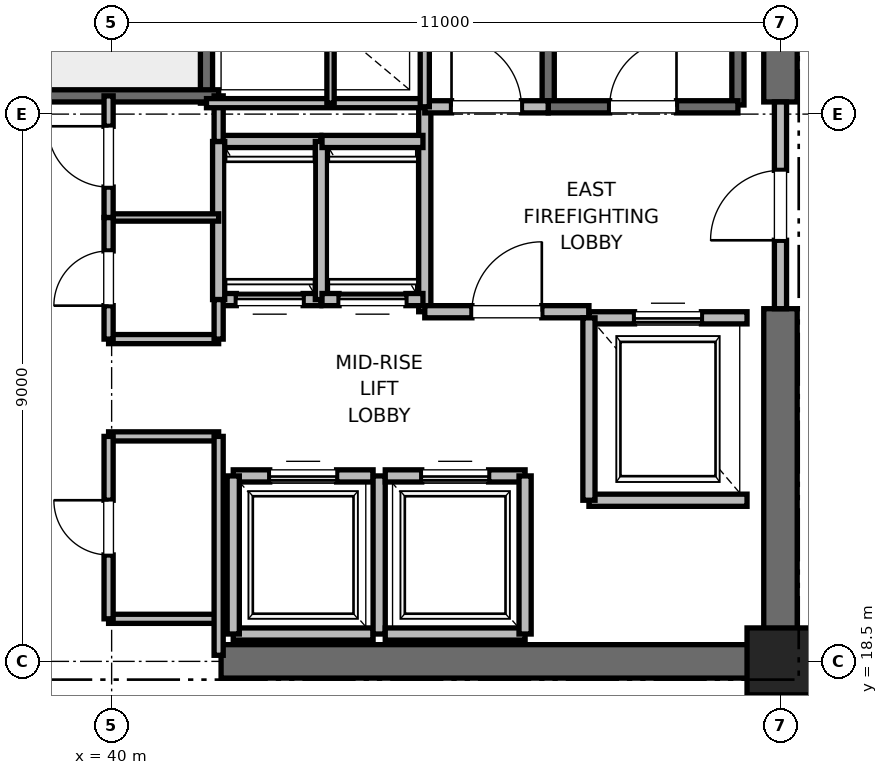
"""IFC4 building model, lengths in metres.
Left out: names, types, materials, properties, quantities, classifications, styles, units other than length and angle.
Written with IfcOpenShell. Run it as: python <this file> out.ifc"""

import sys

from ifc_helpers import new_model, si_unit, direction, frame, frame_2d, origin, origin_2d, place, context, subcontext, project, spatial, rectangle, extrude, element, fill, save


model = new_model("IFC4")
c1 = context("Model", 3, precision=1e-05, world=origin(), true_north=direction((0.0, 1.0)))
c2 = subcontext(c1, "Body", "Model", "MODEL_VIEW")
j1 = project(units=[si_unit("LENGTHUNIT", "METRE"), si_unit("PLANEANGLEUNIT", "RADIAN")], contexts=[c1])
p1 = place(None, origin())
s1 = spatial("IfcSite", under=j1, at=p1, CompositionType="ELEMENT")
p2 = place(p1, origin())
s2 = spatial("IfcBuilding", under=s1, at=p2, CompositionType="ELEMENT")
p3 = place(p2, frame((0.0, 0.0, 172.4)))
s3 = spatial("IfcBuildingStorey", under=s2, at=p3, CompositionType="ELEMENT", Elevation=172.4)
p4 = place(p3, frame((51.0, 18.5, 0.0), z_axis=(0.0, 0.0, 1.0), x_axis=(1.0, 0.0, 0.0)))
e1 = element("IfcColumn", 1, at=p4, inside=s3, PredefinedType="PILASTER", context=c2, shape_type="SweptSolid", body=[
    extrude(rectangle(XDim=1.1, YDim=1.1, at=origin_2d()), origin(), (0.0, 0.0, 1.0), 4.0),
])
p5 = place(p3, frame((41.8, 18.5, 0.0), z_axis=(0.0, 0.0, 1.0), x_axis=(1.0, 0.0, 0.0)))
e2 = element("IfcWall", 2, at=p5, inside=s3, PredefinedType="SHEAR", context=c2, shape_type="SweptSolid", body=[
    extrude(rectangle(XDim=9.2, YDim=0.55, at=frame_2d((4.6, 0.0))), origin(), (0.0, 0.0, 1.0), 3.775),
])
p6 = place(p3, frame((51.0, 18.5, 0.0), z_axis=(0.0, 0.0, 1.0), x_axis=(0.0, 1.0, 0.0)))
e3 = element("IfcWall", 3, at=p6, inside=s3, PredefinedType="SHEAR", context=c2, shape_type="SweptSolid", body=[
    extrude(rectangle(XDim=5.8, YDim=0.55, at=frame_2d((2.9, 0.0))), origin(), (0.0, 0.0, 1.0), 3.775),
])
p7 = place(p3, frame((51.0, 27.7, 0.0), z_axis=(0.0, 0.0, 1.0), x_axis=(0.0, 1.0, 0.0)))
e4 = element("IfcWall", 4, at=p7, inside=s3, PredefinedType="SHEAR", context=c2, shape_type="SweptSolid", body=[
    extrude(rectangle(XDim=8.8, YDim=0.55, at=frame_2d((4.4, 0.0))), origin(), (0.0, 0.0, 1.0), 3.775),
])
p8 = place(p3, frame((50.3, 27.65, 0.0), z_axis=(0.0, 0.0, 1.0), x_axis=(0.0, 1.0, 0.0)))
e5 = element("IfcWall", 5, at=p8, inside=s3, PredefinedType="SOLIDWALL", context=c2, shape_type="SweptSolid", body=[
    extrude(rectangle(XDim=8.15, YDim=0.2, at=frame_2d((4.075, 0.0))), origin(), (0.0, 0.0, 1.0), 3.775),
])
p9 = place(p3, frame((47.18, 27.62, 0.0), z_axis=(0.0, 0.0, 1.0), x_axis=(0.0, 1.0, 0.0)))
e6 = element("IfcWall", 6, at=p9, inside=s3, PredefinedType="SOLIDWALL", context=c2, shape_type="SweptSolid", body=[
    extrude(rectangle(XDim=8.18, YDim=0.2, at=frame_2d((4.09, 0.0))), origin(), (0.0, 0.0, 1.0), 3.775),
])
p10 = place(p3, frame((47.18, 27.62, 0.0), z_axis=(0.0, 0.0, 1.0), x_axis=(1.0, 0.0, 0.0)))
e7 = element("IfcWall", 7, at=p10, inside=s3, PredefinedType="SOLIDWALL", context=c2, shape_type="SweptSolid", body=[
    extrude(rectangle(XDim=3.12, YDim=0.2, at=frame_2d((1.56, 0.0))), origin(), (0.0, 0.0, 1.0), 3.775),
])
p11 = place(p10, frame((1.01, 0.0, 0.0)))
e8 = element("IfcOpeningElement", 8, at=p11, cuts=e7, PredefinedType="OPENING", context=c2, shape_type="SweptSolid", body=[
    extrude(rectangle(XDim=1.1, YDim=2.15, at=frame_2d((0.55, 1.075))), frame((0.0, 0.1, 0.0), z_axis=(0.0, -1.0, 0.0), x_axis=(1.0, 0.0, 0.0)), (0.0, 0.0, 1.0), 0.2),
])
p12 = place(p3, frame((41.56, 27.68, 0.0), z_axis=(0.0, 0.0, 1.0), x_axis=(0.0, 1.0, 0.0)))
e9 = element("IfcWall", 9, at=p12, inside=s3, PredefinedType="SOLIDWALL", context=c2, shape_type="SweptSolid", body=[
    extrude(rectangle(XDim=8.57, YDim=0.2, at=frame_2d((4.285, 0.0))), origin(), (0.0, 0.0, 1.0), 3.775),
])
p13 = place(p3, frame((38.44, 27.8, 0.0), z_axis=(0.0, 0.0, 1.0), x_axis=(1.0, 0.0, 0.0)))
e10 = element("IfcWall", 10, at=p13, inside=s3, PredefinedType="SOLIDWALL", context=c2, shape_type="SweptSolid", body=[
    extrude(rectangle(XDim=3.32, YDim=0.2, at=frame_2d((1.66, 0.0))), origin(), (0.0, 0.0, 1.0), 3.775),
])
p14 = place(p3, frame((45.15, 24.25, 0.0), z_axis=(0.0, 0.0, 1.0), x_axis=(0.0, 1.0, 0.0)))
e11 = element("IfcWall", 11, at=p14, inside=s3, PredefinedType="PARTITIONING", context=c2, shape_type="SweptSolid", body=[
    extrude(rectangle(XDim=3.37, YDim=0.2, at=frame_2d((1.685, 0.0))), origin(), (0.0, 0.0, 1.0), 3.775),
])
p15 = place(p3, frame((45.15, 24.25, 0.0), z_axis=(0.0, 0.0, 1.0), x_axis=(1.0, 0.0, 0.0)))
e12 = element("IfcWall", 12, at=p15, inside=s3, PredefinedType="PARTITIONING", context=c2, shape_type="SweptSolid", body=[
    extrude(rectangle(XDim=2.7, YDim=0.2, at=frame_2d((1.35, 0.0))), origin(), (0.0, 0.0, 1.0), 3.775),
])
p16 = place(p15, frame((0.775, 0.0, 0.0)))
e13 = element("IfcOpeningElement", 13, at=p16, cuts=e12, PredefinedType="OPENING", context=c2, shape_type="SweptSolid", body=[
    extrude(rectangle(XDim=1.15, YDim=2.2, at=frame_2d((0.575, 1.1))), frame((0.0, 0.1, 0.0), z_axis=(0.0, -1.0, 0.0), x_axis=(1.0, 0.0, 0.0)), (0.0, 0.0, 1.0), 0.2),
])
p17 = place(p3, frame((45.15, 27.62, 0.0), z_axis=(0.0, 0.0, 1.0), x_axis=(1.0, 0.0, 0.0)))
e14 = element("IfcWall", 14, at=p17, inside=s3, PredefinedType="PARTITIONING", context=c2, shape_type="SweptSolid", body=[
    extrude(rectangle(XDim=2.03, YDim=0.2, at=frame_2d((1.015, 0.0))), origin(), (0.0, 0.0, 1.0), 3.775),
])
p18 = place(p17, frame((0.44, 0.0, 0.0)))
e15 = element("IfcOpeningElement", 15, at=p18, cuts=e14, PredefinedType="OPENING", context=c2, shape_type="SweptSolid", body=[
    extrude(rectangle(XDim=1.15, YDim=2.2, at=frame_2d((0.575, 1.1))), frame((0.0, 0.1, 0.0), z_axis=(0.0, -1.0, 0.0), x_axis=(1.0, 0.0, 0.0)), (0.0, 0.0, 1.0), 0.2),
])
p19 = place(p3, frame((51.0, 24.3, 0.0), z_axis=(0.0, 0.0, 1.0), x_axis=(0.0, 1.0, 0.0)))
e16 = element("IfcWall", 16, at=p19, inside=s3, PredefinedType="PARTITIONING", context=c2, shape_type="SweptSolid", body=[
    extrude(rectangle(XDim=3.4, YDim=0.2, at=frame_2d((1.7, 0.0))), origin(), (0.0, 0.0, 1.0), 2.755),
])
p20 = place(p19, frame((1.125, 0.0, 0.0)))
e17 = element("IfcOpeningElement", 17, at=p20, cuts=e16, PredefinedType="OPENING", context=c2, shape_type="SweptSolid", body=[
    extrude(rectangle(XDim=1.15, YDim=2.2, at=frame_2d((0.575, 1.1))), frame((0.0, 0.1, 0.0), z_axis=(0.0, -1.0, 0.0), x_axis=(1.0, 0.0, 0.0)), (0.0, 0.0, 1.0), 0.2),
])
p21 = place(p3, frame((47.85, 21.15, 0.0), z_axis=(0.0, 0.0, 1.0), x_axis=(1.0, 0.0, 0.0)))
e18 = element("IfcWall", 18, at=p21, inside=s3, PredefinedType="SOLIDWALL", context=c2, shape_type="SweptSolid", body=[
    extrude(rectangle(XDim=2.6, YDim=0.2, at=frame_2d((1.3, 0.0))), origin(), (0.0, 0.0, 1.0), 3.775),
])
p22 = place(p3, frame((50.45, 24.15, 0.0), z_axis=(0.0, 0.0, 1.0), x_axis=(-1.0, 0.0, 0.0)))
e19 = element("IfcWall", 19, at=p22, inside=s3, PredefinedType="SOLIDWALL", context=c2, shape_type="SweptSolid", body=[
    extrude(rectangle(XDim=2.6, YDim=0.2, at=frame_2d((1.3, 0.0))), origin(), (0.0, 0.0, 1.0), 2.755),
])
p23 = place(p22, frame((0.75, 0.0, 0.0)))
e20 = element("IfcOpeningElement", 20, at=p23, cuts=e19, PredefinedType="OPENING", context=c2, shape_type="SweptSolid", body=[
    extrude(rectangle(XDim=1.1, YDim=2.2, at=frame_2d((0.55, 1.1))), frame((0.0, 0.1, 0.0), z_axis=(0.0, -1.0, 0.0), x_axis=(1.0, 0.0, 0.0)), (0.0, 0.0, 1.0), 0.2),
])
p24 = place(p3, frame((47.85, 24.15, 0.0), z_axis=(0.0, 0.0, 1.0), x_axis=(0.0, -1.0, 0.0)))
e21 = element("IfcWall", 21, at=p24, inside=s3, PredefinedType="SOLIDWALL", context=c2, shape_type="SweptSolid", body=[
    extrude(rectangle(XDim=3.0, YDim=0.2, at=frame_2d((1.5, 0.0))), origin(), (0.0, 0.0, 1.0), 3.775),
])
p25 = place(p3, frame((42.0, 18.95, 0.0), z_axis=(0.0, 0.0, 1.0), x_axis=(1.0, 0.0, 0.0)))
e22 = element("IfcWall", 22, at=p25, inside=s3, PredefinedType="SOLIDWALL", context=c2, shape_type="SweptSolid", body=[
    extrude(rectangle(XDim=2.3, YDim=0.2, at=frame_2d((1.15, 0.0))), origin(), (0.0, 0.0, 1.0), 2.755),
])
p26 = place(p3, frame((44.3, 21.55, 0.0), z_axis=(0.0, 0.0, 1.0), x_axis=(-1.0, 0.0, 0.0)))
e23 = element("IfcWall", 23, at=p26, inside=s3, PredefinedType="SOLIDWALL", context=c2, shape_type="SweptSolid", body=[
    extrude(rectangle(XDim=2.3, YDim=0.2, at=frame_2d((1.15, 0.0))), origin(), (0.0, 0.0, 1.0), 3.775),
])
p27 = place(p26, frame((0.6, 0.0, 0.0)))
e24 = element("IfcOpeningElement", 24, at=p27, cuts=e23, PredefinedType="OPENING", context=c2, shape_type="SweptSolid", body=[
    extrude(rectangle(XDim=1.1, YDim=2.2, at=frame_2d((0.55, 1.1))), frame((0.0, 0.1, 0.0), z_axis=(0.0, -1.0, 0.0), x_axis=(1.0, 0.0, 0.0)), (0.0, 0.0, 1.0), 0.2),
])
p28 = place(p3, frame((42.0, 21.55, 0.0), z_axis=(0.0, 0.0, 1.0), x_axis=(0.0, -1.0, 0.0)))
e25 = element("IfcWall", 25, at=p28, inside=s3, PredefinedType="SOLIDWALL", context=c2, shape_type="SweptSolid", body=[
    extrude(rectangle(XDim=2.6, YDim=0.2, at=frame_2d((1.3, 0.0))), origin(), (0.0, 0.0, 1.0), 2.755),
])
p29 = place(p3, frame((44.4, 18.95, 0.0), z_axis=(0.0, 0.0, 1.0), x_axis=(0.0, 1.0, 0.0)))
e26 = element("IfcWall", 26, at=p29, inside=s3, PredefinedType="SOLIDWALL", context=c2, shape_type="SweptSolid", body=[
    extrude(rectangle(XDim=2.6, YDim=0.2, at=frame_2d((1.3, 0.0))), origin(), (0.0, 0.0, 1.0), 3.775),
])
p30 = place(p3, frame((44.5, 18.95, 0.0), z_axis=(0.0, 0.0, 1.0), x_axis=(1.0, 0.0, 0.0)))
e27 = element("IfcWall", 27, at=p30, inside=s3, PredefinedType="SOLIDWALL", context=c2, shape_type="SweptSolid", body=[
    extrude(rectangle(XDim=2.3, YDim=0.2, at=frame_2d((1.15, 0.0))), origin(), (0.0, 0.0, 1.0), 3.775),
])
p31 = place(p3, frame((46.8, 21.55, 0.0), z_axis=(0.0, 0.0, 1.0), x_axis=(-1.0, 0.0, 0.0)))
e28 = element("IfcWall", 28, at=p31, inside=s3, PredefinedType="SOLIDWALL", context=c2, shape_type="SweptSolid", body=[
    extrude(rectangle(XDim=2.3, YDim=0.2, at=frame_2d((1.15, 0.0))), origin(), (0.0, 0.0, 1.0), 3.775),
])
p32 = place(p31, frame((0.6, 0.0, 0.0)))
e29 = element("IfcOpeningElement", 29, at=p32, cuts=e28, PredefinedType="OPENING", context=c2, shape_type="SweptSolid", body=[
    extrude(rectangle(XDim=1.1, YDim=2.2, at=frame_2d((0.55, 1.1))), frame((0.0, 0.1, 0.0), z_axis=(0.0, -1.0, 0.0), x_axis=(1.0, 0.0, 0.0)), (0.0, 0.0, 1.0), 0.2),
])
p33 = place(p3, frame((46.8, 18.95, 0.0), z_axis=(0.0, 0.0, 1.0), x_axis=(0.0, 1.0, 0.0)))
e30 = element("IfcWall", 30, at=p33, inside=s3, PredefinedType="SOLIDWALL", context=c2, shape_type="SweptSolid", body=[
    extrude(rectangle(XDim=2.6, YDim=0.2, at=frame_2d((1.3, 0.0))), origin(), (0.0, 0.0, 1.0), 3.775),
])
p34 = place(p3, frame((41.76, 24.45, 0.0), z_axis=(0.0, 0.0, 1.0), x_axis=(1.0, 0.0, 0.0)))
e31 = element("IfcWall", 31, at=p34, inside=s3, PredefinedType="SOLIDWALL", context=c2, shape_type="SweptSolid", body=[
    extrude(rectangle(XDim=1.68, YDim=0.2, at=frame_2d((0.84, 0.0))), origin(), (0.0, 0.0, 1.0), 3.775),
])
p35 = place(p34, frame((0.29, 0.0, 0.0)))
e32 = element("IfcOpeningElement", 32, at=p35, cuts=e31, PredefinedType="OPENING", context=c2, shape_type="SweptSolid", body=[
    extrude(rectangle(XDim=1.1, YDim=2.2, at=frame_2d((0.55, 1.1))), frame((0.0, 0.1, 0.0), z_axis=(0.0, -1.0, 0.0), x_axis=(1.0, 0.0, 0.0)), (0.0, 0.0, 1.0), 0.2),
])
p36 = place(p3, frame((43.44, 27.05, 0.0), z_axis=(0.0, 0.0, 1.0), x_axis=(-1.0, 0.0, 0.0)))
e33 = element("IfcWall", 33, at=p36, inside=s3, PredefinedType="SOLIDWALL", context=c2, shape_type="SweptSolid", body=[
    extrude(rectangle(XDim=1.68, YDim=0.2, at=frame_2d((0.84, 0.0))), origin(), (0.0, 0.0, 1.0), 3.775),
])
for number, where, z_axis, x_axis in (
    (34, (41.76, 27.05, 0.0), (0.0, 0.0, 1.0), (0.0, -1.0, 0.0)),
    (35, (43.45, 24.45, 0.0), (0.0, 0.0, 1.0), (0.0, 1.0, 0.0)),
):
    element("IfcWall", number, at=place(p3, frame(where, z_axis=z_axis, x_axis=x_axis)), inside=s3, PredefinedType="SOLIDWALL", context=c2, shape_type="SweptSolid", body=[
        extrude(rectangle(XDim=2.6, YDim=0.2, at=frame_2d((1.3, 0.0))), origin(), (0.0, 0.0, 1.0), 3.775),
    ])
p37 = place(p3, frame((43.46, 24.45, 0.0), z_axis=(0.0, 0.0, 1.0), x_axis=(1.0, 0.0, 0.0)))
e36 = element("IfcWall", 36, at=p37, inside=s3, PredefinedType="SOLIDWALL", context=c2, shape_type="SweptSolid", body=[
    extrude(rectangle(XDim=1.66, YDim=0.2, at=frame_2d((0.83, 0.0))), origin(), (0.0, 0.0, 1.0), 3.775),
])
p38 = place(p37, frame((0.28, 0.0, 0.0)))
e37 = element("IfcOpeningElement", 37, at=p38, cuts=e36, PredefinedType="OPENING", context=c2, shape_type="SweptSolid", body=[
    extrude(rectangle(XDim=1.1, YDim=2.2, at=frame_2d((0.55, 1.1))), frame((0.0, 0.1, 0.0), z_axis=(0.0, -1.0, 0.0), x_axis=(1.0, 0.0, 0.0)), (0.0, 0.0, 1.0), 0.2),
])
p39 = place(p3, frame((45.12, 27.05, 0.0), z_axis=(0.0, 0.0, 1.0), x_axis=(-1.0, 0.0, 0.0)))
e38 = element("IfcWall", 38, at=p39, inside=s3, PredefinedType="SOLIDWALL", context=c2, shape_type="SweptSolid", body=[
    extrude(rectangle(XDim=1.66, YDim=0.2, at=frame_2d((0.83, 0.0))), origin(), (0.0, 0.0, 1.0), 3.775),
])
for number, where, z_axis, x_axis in (
    (39, (39.95, 19.2, 0.0), (0.0, 0.0, 1.0), (1.0, 0.0, 0.0)),
    (40, (39.95, 22.2, 0.0), (0.0, 0.0, 1.0), (1.0, 0.0, 0.0)),
    (41, (39.95, 23.8, 0.0), (0.0, 0.0, 1.0), (1.0, 0.0, 0.0)),
):
    element("IfcWall", number, at=place(p3, frame(where, z_axis=z_axis, x_axis=x_axis)), inside=s3, PredefinedType="PARTITIONING", context=c2, shape_type="SweptSolid", body=[
        extrude(rectangle(XDim=1.81, YDim=0.15, at=frame_2d((0.905, 0.0))), origin(), (0.0, 0.0, 1.0), 2.85),
    ])
p40 = place(p3, frame((39.95, 25.8, 0.0), z_axis=(0.0, 0.0, 1.0), x_axis=(1.0, 0.0, 0.0)))
e42 = element("IfcWall", 42, at=p40, inside=s3, PredefinedType="PARTITIONING", context=c2, shape_type="SweptSolid", body=[
    extrude(rectangle(XDim=1.81, YDim=0.12, at=frame_2d((0.905, 0.0))), origin(), (0.0, 0.0, 1.0), 2.85),
])
p41 = place(p3, frame((41.76, 18.6, 0.0), z_axis=(0.0, 0.0, 1.0), x_axis=(0.0, 1.0, 0.0)))
e43 = element("IfcWall", 43, at=p41, inside=s3, PredefinedType="PARTITIONING", context=c2, shape_type="SweptSolid", body=[
    extrude(rectangle(XDim=3.6, YDim=0.15, at=frame_2d((1.8, 0.0))), origin(), (0.0, 0.0, 1.0), 2.755),
])
p42 = place(p3, frame((41.76, 23.8, 0.0), z_axis=(0.0, 0.0, 1.0), x_axis=(0.0, 1.0, 0.0)))
e44 = element("IfcWall", 44, at=p42, inside=s3, PredefinedType="PARTITIONING", context=c2, shape_type="SweptSolid", body=[
    extrude(rectangle(XDim=0.65, YDim=0.15, at=frame_2d((0.325, 0.0))), origin(), (0.0, 0.0, 1.0), 2.85),
])
p43 = place(p3, frame((41.76, 27.05, 0.0), z_axis=(0.0, 0.0, 1.0), x_axis=(0.0, 1.0, 0.0)))
e45 = element("IfcWall", 45, at=p43, inside=s3, PredefinedType="PARTITIONING", context=c2, shape_type="SweptSolid", body=[
    extrude(rectangle(XDim=0.75, YDim=0.15, at=frame_2d((0.375, 0.0))), origin(), (0.0, 0.0, 1.0), 2.85),
])
p44 = place(p3, frame((39.95, 19.2, 0.0), z_axis=(0.0, 0.0, 1.0), x_axis=(0.0, 1.0, 0.0)))
e46 = element("IfcWall", 46, at=p44, inside=s3, PredefinedType="PARTITIONING", context=c2, shape_type="SweptSolid", body=[
    extrude(rectangle(XDim=3.0, YDim=0.15, at=frame_2d((1.5, 0.0))), origin(), (0.0, 0.0, 1.0), 2.85),
])
p45 = place(p44, frame((1.05, 0.0, 0.0)))
e47 = element("IfcOpeningElement", 47, at=p45, cuts=e46, PredefinedType="OPENING", context=c2, shape_type="SweptSolid", body=[
    extrude(rectangle(XDim=0.9, YDim=2.1, at=frame_2d((0.45, 1.05))), frame((0.0, 0.075, 0.0), z_axis=(0.0, -1.0, 0.0), x_axis=(1.0, 0.0, 0.0)), (0.0, 0.0, 1.0), 0.15),
])
p46 = place(p3, frame((39.95, 23.8, 0.0), z_axis=(0.0, 0.0, 1.0), x_axis=(0.0, 1.0, 0.0)))
e48 = element("IfcWall", 48, at=p46, inside=s3, PredefinedType="PARTITIONING", context=c2, shape_type="SweptSolid", body=[
    extrude(rectangle(XDim=2.0, YDim=0.15, at=frame_2d((1.0, 0.0))), origin(), (0.0, 0.0, 1.0), 2.85),
])
p47 = place(p46, frame((0.55, 0.0, 0.0)))
e49 = element("IfcOpeningElement", 49, at=p47, cuts=e48, PredefinedType="OPENING", context=c2, shape_type="SweptSolid", body=[
    extrude(rectangle(XDim=0.9, YDim=2.1, at=frame_2d((0.45, 1.05))), frame((0.0, 0.075, 0.0), z_axis=(0.0, -1.0, 0.0), x_axis=(1.0, 0.0, 0.0)), (0.0, 0.0, 1.0), 0.15),
])
p48 = place(p3, frame((39.95, 25.8, 0.0), z_axis=(0.0, 0.0, 1.0), x_axis=(0.0, 1.0, 0.0)))
e50 = element("IfcWall", 50, at=p48, inside=s3, PredefinedType="PARTITIONING", context=c2, shape_type="SweptSolid", body=[
    extrude(rectangle(XDim=2.0, YDim=0.15, at=frame_2d((1.0, 0.0))), origin(), (0.0, 0.0, 1.0), 2.85),
])
p49 = place(p48, frame((0.5, 0.0, 0.0)))
e51 = element("IfcOpeningElement", 51, at=p49, cuts=e50, PredefinedType="OPENING", context=c2, shape_type="SweptSolid", body=[
    extrude(rectangle(XDim=1.0, YDim=2.15, at=frame_2d((0.5, 1.075))), frame((0.0, 0.075, 0.0), z_axis=(0.0, -1.0, 0.0), x_axis=(1.0, 0.0, 0.0)), (0.0, 0.0, 1.0), 0.15),
])
p50 = place(p3, frame((41.56, 27.68, 0.0), z_axis=(0.0, 0.0, 1.0), x_axis=(1.0, 0.0, 0.0)))
e52 = element("IfcWall", 52, at=p50, inside=s3, PredefinedType="PARTITIONING", context=c2, shape_type="SweptSolid", body=[
    extrude(rectangle(XDim=3.59, YDim=0.15, at=frame_2d((1.795, 0.0))), origin(), (0.0, 0.0, 1.0), 2.85),
])
p51 = place(p3, frame((45.15, 27.62, 0.0), z_axis=(0.0, 0.0, 1.0), x_axis=(0.0, 1.0, 0.0)))
e53 = element("IfcWall", 53, at=p51, inside=s3, PredefinedType="PARTITIONING", context=c2, shape_type="SweptSolid", body=[
    extrude(rectangle(XDim=3.1, YDim=0.15, at=frame_2d((1.55, 0.0))), origin(), (0.0, 0.0, 1.0), 2.85),
])
p52 = place(p3, frame((43.6, 27.68, 0.0), z_axis=(0.0, 0.0, 1.0), x_axis=(0.0, 1.0, 0.0)))
e54 = element("IfcWall", 54, at=p52, inside=s3, PredefinedType="PARTITIONING", context=c2, shape_type="SweptSolid", body=[
    extrude(rectangle(XDim=3.04, YDim=0.12, at=frame_2d((1.52, 0.0))), origin(), (0.0, 0.0, 1.0), 2.85),
])
p53 = place(p11, origin())
e55 = element("IfcDoor", 55, at=p53, inside=s3, OperationType="SINGLE_SWING_RIGHT", PredefinedType="DOOR", context=c2, shape_type="SweptSolid", body=[
    extrude(rectangle(XDim=1.1, YDim=2.15, at=frame_2d((0.55, 1.075))), frame((0.0, 0.025, 0.0), z_axis=(0.0, -1.0, 0.0), x_axis=(1.0, 0.0, 0.0)), (0.0, 0.0, 1.0), 0.05),
])
fill(e8, e55)
p54 = place(p16, origin())
e56 = element("IfcDoor", 56, at=p54, inside=s3, OperationType="SINGLE_SWING_RIGHT", PredefinedType="DOOR", context=c2, shape_type="SweptSolid", body=[
    extrude(rectangle(XDim=1.15, YDim=2.2, at=frame_2d((0.575, 1.1))), frame((0.0, 0.025, 0.0), z_axis=(0.0, -1.0, 0.0), x_axis=(1.0, 0.0, 0.0)), (0.0, 0.0, 1.0), 0.05),
])
fill(e13, e56)
p55 = place(p18, origin())
e57 = element("IfcDoor", 57, at=p55, inside=s3, OperationType="SINGLE_SWING_LEFT", PredefinedType="DOOR", context=c2, shape_type="SweptSolid", body=[
    extrude(rectangle(XDim=1.15, YDim=2.2, at=frame_2d((0.575, 1.1))), frame((0.0, 0.025, 0.0), z_axis=(0.0, -1.0, 0.0), x_axis=(1.0, 0.0, 0.0)), (0.0, 0.0, 1.0), 0.05),
])
fill(e15, e57)
p56 = place(p20, origin())
e58 = element("IfcDoor", 58, at=p56, inside=s3, OperationType="SINGLE_SWING_LEFT", PredefinedType="DOOR", context=c2, shape_type="SweptSolid", body=[
    extrude(rectangle(XDim=1.15, YDim=2.2, at=frame_2d((0.575, 1.1))), frame((0.0, 0.025, 0.0), z_axis=(0.0, -1.0, 0.0), x_axis=(1.0, 0.0, 0.0)), (0.0, 0.0, 1.0), 0.05),
])
fill(e17, e58)
p57 = place(p23, origin())
e59 = element("IfcDoor", 59, at=p57, inside=s3, OperationType="SLIDING_TO_RIGHT", PredefinedType="DOOR", context=c2, shape_type="SweptSolid", body=[
    extrude(rectangle(XDim=1.1, YDim=2.2, at=frame_2d((0.55, 1.1))), frame((0.0, 0.025, 0.0), z_axis=(0.0, -1.0, 0.0), x_axis=(1.0, 0.0, 0.0)), (0.0, 0.0, 1.0), 0.05),
])
fill(e20, e59)
p58 = place(p27, origin())
e60 = element("IfcDoor", 60, at=p58, inside=s3, OperationType="SLIDING_TO_RIGHT", PredefinedType="DOOR", context=c2, shape_type="SweptSolid", body=[
    extrude(rectangle(XDim=1.1, YDim=2.2, at=frame_2d((0.55, 1.1))), frame((0.0, 0.025, 0.0), z_axis=(0.0, -1.0, 0.0), x_axis=(1.0, 0.0, 0.0)), (0.0, 0.0, 1.0), 0.05),
])
fill(e24, e60)
p59 = place(p32, origin())
e61 = element("IfcDoor", 61, at=p59, inside=s3, OperationType="SLIDING_TO_RIGHT", PredefinedType="DOOR", context=c2, shape_type="SweptSolid", body=[
    extrude(rectangle(XDim=1.1, YDim=2.2, at=frame_2d((0.55, 1.1))), frame((0.0, 0.025, 0.0), z_axis=(0.0, -1.0, 0.0), x_axis=(1.0, 0.0, 0.0)), (0.0, 0.0, 1.0), 0.05),
])
fill(e29, e61)
p60 = place(p35, origin())
e62 = element("IfcDoor", 62, at=p60, inside=s3, OperationType="SLIDING_TO_RIGHT", PredefinedType="DOOR", context=c2, shape_type="SweptSolid", body=[
    extrude(rectangle(XDim=1.1, YDim=2.2, at=frame_2d((0.55, 1.1))), frame((0.0, 0.025, 0.0), z_axis=(0.0, -1.0, 0.0), x_axis=(1.0, 0.0, 0.0)), (0.0, 0.0, 1.0), 0.05),
])
fill(e32, e62)
p61 = place(p38, origin())
e63 = element("IfcDoor", 63, at=p61, inside=s3, OperationType="SLIDING_TO_RIGHT", PredefinedType="DOOR", context=c2, shape_type="SweptSolid", body=[
    extrude(rectangle(XDim=1.1, YDim=2.2, at=frame_2d((0.55, 1.1))), frame((0.0, 0.025, 0.0), z_axis=(0.0, -1.0, 0.0), x_axis=(1.0, 0.0, 0.0)), (0.0, 0.0, 1.0), 0.05),
])
fill(e37, e63)
p62 = place(p45, origin())
e64 = element("IfcDoor", 64, at=p62, inside=s3, OperationType="SINGLE_SWING_RIGHT", PredefinedType="DOOR", context=c2, shape_type="SweptSolid", body=[
    extrude(rectangle(XDim=0.9, YDim=2.1, at=frame_2d((0.45, 1.05))), frame((0.0, 0.025, 0.0), z_axis=(0.0, -1.0, 0.0), x_axis=(1.0, 0.0, 0.0)), (0.0, 0.0, 1.0), 0.05),
])
fill(e47, e64)
p63 = place(p47, origin())
e65 = element("IfcDoor", 65, at=p63, inside=s3, OperationType="SINGLE_SWING_LEFT", PredefinedType="DOOR", context=c2, shape_type="SweptSolid", body=[
    extrude(rectangle(XDim=0.9, YDim=2.1, at=frame_2d((0.45, 1.05))), frame((0.0, 0.025, 0.0), z_axis=(0.0, -1.0, 0.0), x_axis=(1.0, 0.0, 0.0)), (0.0, 0.0, 1.0), 0.05),
])
fill(e49, e65)
p64 = place(p49, origin())
e66 = element("IfcDoor", 66, at=p64, inside=s3, OperationType="SINGLE_SWING_RIGHT", PredefinedType="DOOR", context=c2, shape_type="SweptSolid", body=[
    extrude(rectangle(XDim=1.0, YDim=2.15, at=frame_2d((0.5, 1.075))), frame((0.0, 0.025, 0.0), z_axis=(0.0, -1.0, 0.0), x_axis=(1.0, 0.0, 0.0)), (0.0, 0.0, 1.0), 0.05),
])
fill(e51, e66)
save(model, sys.argv[1])
